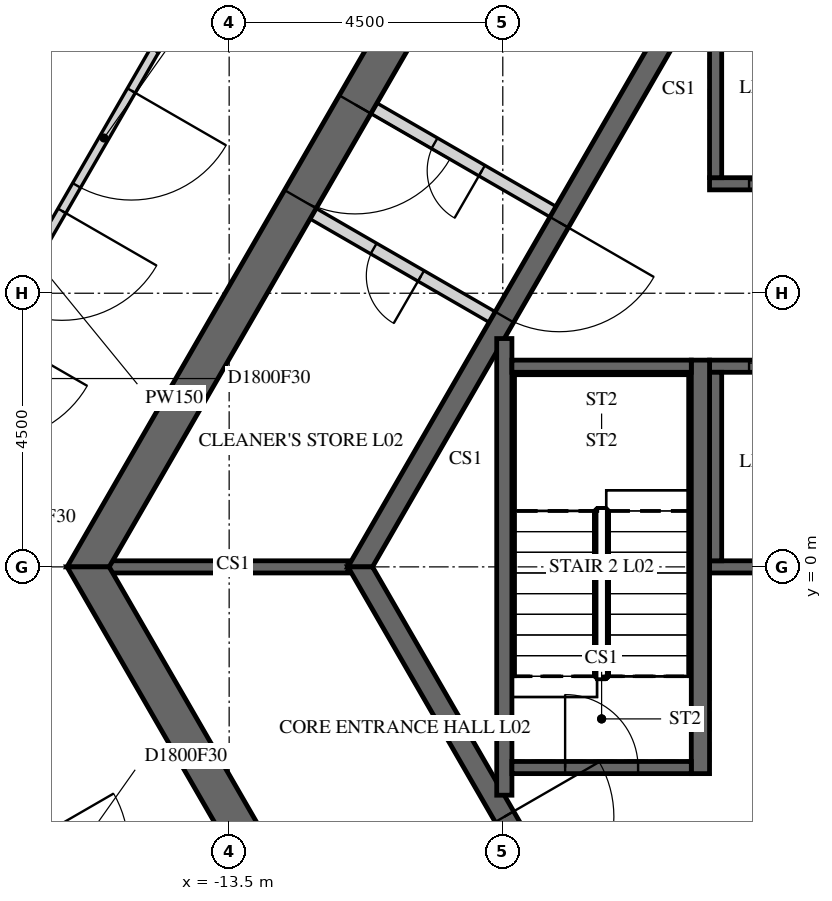
"""IFC4 building model, lengths in metres.
Left out: names, types, materials, properties, quantities, classifications, styles, units other than length and angle.
Written with IfcOpenShell. Run it as: python <this file> out.ifc"""

import sys

from ifc_helpers import new_model, si_unit, direction, frame, frame_2d, origin, place, context, subcontext, project, spatial, polyline, rectangle, outline, extrude, element, fill, save


model = new_model("IFC4")
c1 = context("Model", 3, precision=1e-05, world=origin(), true_north=direction((0.0, 1.0)))
c2 = subcontext(c1, "Body", "Model", "MODEL_VIEW")
j1 = project(units=[si_unit("LENGTHUNIT", "METRE"), si_unit("PLANEANGLEUNIT", "RADIAN")], contexts=[c1])
p1 = place(None, origin())
s1 = spatial("IfcSite", under=j1, at=p1, CompositionType="ELEMENT")
p2 = place(p1, origin())
s2 = spatial("IfcBuilding", under=s1, at=p2, CompositionType="ELEMENT")
p3 = place(p2, frame((0.0, 0.0, 15.0)))
s3 = spatial("IfcBuildingStorey", under=s2, at=p3, CompositionType="ELEMENT", Elevation=15.0)
p4 = place(p3, frame((-7.91, 13.7, -0.25), z_axis=(0.0, 0.0, 1.0), x_axis=(-0.499999880136, -0.866025472988, 0.0)))
e1 = element("IfcWall", 1, at=p4, inside=s3, PredefinedType="SHEAR", context=c2, shape_type="SweptSolid", body=[
    extrude(outline(polyline([(-0.173, -0.3), (15.993, -0.3), (15.646, 0.3), (0.173, 0.3), (-0.173, -0.3)])), origin(), (0.0, 0.0, 1.0), 5.5),
])
p5 = place(p4, frame((7.039, 0.0, 0.25)))
e2 = element("IfcOpeningElement", 2, at=p5, cuts=e1, PredefinedType="OPENING", context=c2, shape_type="SweptSolid", body=[
    extrude(rectangle(XDim=1.8, YDim=2.4, at=frame_2d((0.9, 1.2))), frame((0.0, 0.31, 0.0), z_axis=(0.0, -1.0, 0.0), x_axis=(1.0, 0.0, 0.0)), (0.0, 0.0, 1.0), 0.62),
])
p6 = place(p3, frame((-15.819, 0.0, -0.25), z_axis=(0.0, 0.0, 1.0), x_axis=(0.499999880136, -0.866025472988, 0.0)))
e3 = element("IfcWall", 3, at=p6, inside=s3, PredefinedType="SHEAR", context=c2, shape_type="SweptSolid", body=[
    extrude(outline(polyline([(-0.173, -0.3), (15.993, -0.3), (15.646, 0.3), (0.173, 0.3), (-0.173, -0.3)])), origin(), (0.0, 0.0, 1.0), 5.5),
])
p7 = place(p6, frame((6.981, 0.0, 0.25)))
e4 = element("IfcOpeningElement", 4, at=p7, cuts=e3, PredefinedType="OPENING", context=c2, shape_type="SweptSolid", body=[
    extrude(rectangle(XDim=1.8, YDim=2.4, at=frame_2d((0.9, 1.2))), frame((0.0, 0.31, 0.0), z_axis=(0.0, -1.0, 0.0), x_axis=(1.0, 0.0, 0.0)), (0.0, 0.0, 1.0), 0.62),
])
p8 = place(p3, frame((-5.673, 9.825, -0.25), z_axis=(0.0, 0.0, 1.0), x_axis=(-0.499995046907, -0.866028263435, 0.0)))
e5 = element("IfcWall", 5, at=p8, inside=s3, PredefinedType="SHEAR", context=c2, shape_type="SweptSolid", body=[
    extrude(outline(polyline([(-0.101, -0.175), (11.446, -0.175), (11.244, 0.175), (0.101, 0.175), (-0.101, -0.175)])), origin(), (0.0, 0.0, 1.0), 5.5),
])
p9 = place(p8, frame((4.801, 0.0, 0.25)))
e6 = element("IfcOpeningElement", 6, at=p9, cuts=e5, PredefinedType="OPENING", context=c2, shape_type="SweptSolid", body=[
    extrude(rectangle(XDim=1.8, YDim=2.4, at=frame_2d((0.9, 1.2))), frame((0.0, 0.185, 0.0), z_axis=(0.0, -1.0, 0.0), x_axis=(1.0, 0.0, 0.0)), (0.0, 0.0, 1.0), 0.37),
])
p10 = place(p3, frame((-11.345, 0.0, -0.25), z_axis=(0.0, 0.0, 1.0), x_axis=(0.499995046907, -0.866028263435, 0.0)))
e7 = element("IfcWall", 7, at=p10, inside=s3, PredefinedType="SHEAR", context=c2, shape_type="SweptSolid", body=[
    extrude(outline(polyline([(-0.101, -0.175), (11.446, -0.175), (11.244, 0.175), (0.101, 0.175), (-0.101, -0.175)])), origin(), (0.0, 0.0, 1.0), 5.5),
])
p11 = place(p10, frame((4.744, 0.0, 0.25)))
e8 = element("IfcOpeningElement", 8, at=p11, cuts=e7, PredefinedType="OPENING", context=c2, shape_type="SweptSolid", body=[
    extrude(rectangle(XDim=1.8, YDim=2.4, at=frame_2d((0.9, 1.2))), frame((0.0, 0.185, 0.0), z_axis=(0.0, -1.0, 0.0), x_axis=(1.0, 0.0, 0.0)), (0.0, 0.0, 1.0), 0.37),
])
p12 = place(p3, frame((-5.6, 6.3, -0.25), z_axis=(0.0, 0.0, 1.0), x_axis=(1.0, 0.0, 0.0)))
e9 = element("IfcWall", 9, at=p12, inside=s3, PredefinedType="SHEAR", context=c2, shape_type="SweptSolid", body=[
    extrude(rectangle(XDim=11.2, YDim=0.2, at=frame_2d((5.6, 0.0))), origin(), (0.0, 0.0, 1.0), 5.5),
])
p13 = place(p12, frame((0.65, 0.0, 0.25)))
e10 = element("IfcOpeningElement", 10, at=p13, cuts=e9, PredefinedType="OPENING", context=c2, shape_type="SweptSolid", body=[
    extrude(rectangle(XDim=1.1, YDim=2.1, at=frame_2d((0.55, 1.05))), frame((0.0, 0.11, 0.0), z_axis=(0.0, -1.0, 0.0), x_axis=(1.0, 0.0, 0.0)), (0.0, 0.0, 1.0), 0.22),
])
p14 = place(p12, frame((2.85, 0.0, 0.25)))
e11 = element("IfcOpeningElement", 11, at=p14, cuts=e9, PredefinedType="OPENING", context=c2, shape_type="SweptSolid", body=[
    extrude(rectangle(XDim=1.1, YDim=2.1, at=frame_2d((0.55, 1.05))), frame((0.0, 0.11, 0.0), z_axis=(0.0, -1.0, 0.0), x_axis=(1.0, 0.0, 0.0)), (0.0, 0.0, 1.0), 0.22),
])
p15 = place(p12, frame((5.05, 0.0, 0.25)))
e12 = element("IfcOpeningElement", 12, at=p15, cuts=e9, PredefinedType="OPENING", context=c2, shape_type="SweptSolid", body=[
    extrude(rectangle(XDim=1.1, YDim=2.1, at=frame_2d((0.55, 1.05))), frame((0.0, 0.11, 0.0), z_axis=(0.0, -1.0, 0.0), x_axis=(1.0, 0.0, 0.0)), (0.0, 0.0, 1.0), 0.22),
])
p16 = place(p12, frame((7.25, 0.0, 0.25)))
e13 = element("IfcOpeningElement", 13, at=p16, cuts=e9, PredefinedType="OPENING", context=c2, shape_type="SweptSolid", body=[
    extrude(rectangle(XDim=1.1, YDim=2.1, at=frame_2d((0.55, 1.05))), frame((0.0, 0.11, 0.0), z_axis=(0.0, -1.0, 0.0), x_axis=(1.0, 0.0, 0.0)), (0.0, 0.0, 1.0), 0.22),
])
p17 = place(p12, frame((9.45, 0.0, 0.25)))
e14 = element("IfcOpeningElement", 14, at=p17, cuts=e9, PredefinedType="OPENING", context=c2, shape_type="SweptSolid", body=[
    extrude(rectangle(XDim=1.1, YDim=2.1, at=frame_2d((0.55, 1.05))), frame((0.0, 0.11, 0.0), z_axis=(0.0, -1.0, 0.0), x_axis=(1.0, 0.0, 0.0)), (0.0, 0.0, 1.0), 0.22),
])
p18 = place(p3, frame((-5.5, 6.4, -0.25), z_axis=(0.0, 0.0, 1.0), x_axis=(0.0, 1.0, 0.0)))
e15 = element("IfcWall", 15, at=p18, inside=s3, PredefinedType="SHEAR", context=c2, shape_type="SweptSolid", body=[
    extrude(rectangle(XDim=2.9, YDim=0.2, at=frame_2d((1.45, 0.0))), origin(), (0.0, 0.0, 1.0), 5.5),
])
p19 = place(p3, frame((-5.6, 3.3, -0.25), z_axis=(0.0, 0.0, 1.0), x_axis=(1.0, 0.0, 0.0)))
e16 = element("IfcWall", 16, at=p19, inside=s3, PredefinedType="SHEAR", context=c2, shape_type="SweptSolid", body=[
    extrude(rectangle(XDim=11.2, YDim=0.2, at=frame_2d((5.6, 0.0))), origin(), (0.0, 0.0, 1.0), 5.5),
])
p20 = place(p19, frame((0.65, 0.0, 0.25)))
e17 = element("IfcOpeningElement", 17, at=p20, cuts=e16, PredefinedType="OPENING", context=c2, shape_type="SweptSolid", body=[
    extrude(rectangle(XDim=1.1, YDim=2.1, at=frame_2d((0.55, 1.05))), frame((0.0, 0.11, 0.0), z_axis=(0.0, -1.0, 0.0), x_axis=(1.0, 0.0, 0.0)), (0.0, 0.0, 1.0), 0.22),
])
p21 = place(p19, frame((2.85, 0.0, 0.25)))
e18 = element("IfcOpeningElement", 18, at=p21, cuts=e16, PredefinedType="OPENING", context=c2, shape_type="SweptSolid", body=[
    extrude(rectangle(XDim=1.1, YDim=2.1, at=frame_2d((0.55, 1.05))), frame((0.0, 0.11, 0.0), z_axis=(0.0, -1.0, 0.0), x_axis=(1.0, 0.0, 0.0)), (0.0, 0.0, 1.0), 0.22),
])
p22 = place(p19, frame((5.05, 0.0, 0.25)))
e19 = element("IfcOpeningElement", 19, at=p22, cuts=e16, PredefinedType="OPENING", context=c2, shape_type="SweptSolid", body=[
    extrude(rectangle(XDim=1.1, YDim=2.1, at=frame_2d((0.55, 1.05))), frame((0.0, 0.11, 0.0), z_axis=(0.0, -1.0, 0.0), x_axis=(1.0, 0.0, 0.0)), (0.0, 0.0, 1.0), 0.22),
])
p23 = place(p19, frame((7.25, 0.0, 0.25)))
e20 = element("IfcOpeningElement", 20, at=p23, cuts=e16, PredefinedType="OPENING", context=c2, shape_type="SweptSolid", body=[
    extrude(rectangle(XDim=1.1, YDim=2.1, at=frame_2d((0.55, 1.05))), frame((0.0, 0.11, 0.0), z_axis=(0.0, -1.0, 0.0), x_axis=(1.0, 0.0, 0.0)), (0.0, 0.0, 1.0), 0.22),
])
p24 = place(p19, frame((9.45, 0.0, 0.25)))
e21 = element("IfcOpeningElement", 21, at=p24, cuts=e16, PredefinedType="OPENING", context=c2, shape_type="SweptSolid", body=[
    extrude(rectangle(XDim=1.1, YDim=2.1, at=frame_2d((0.55, 1.05))), frame((0.0, 0.11, 0.0), z_axis=(0.0, -1.0, 0.0), x_axis=(1.0, 0.0, 0.0)), (0.0, 0.0, 1.0), 0.22),
])
p25 = place(p3, frame((-5.6, 0.0, -0.25), z_axis=(0.0, 0.0, 1.0), x_axis=(1.0, 0.0, 0.0)))
e22 = element("IfcWall", 22, at=p25, inside=s3, PredefinedType="SHEAR", context=c2, shape_type="SweptSolid", body=[
    extrude(rectangle(XDim=11.2, YDim=0.2, at=frame_2d((5.6, 0.0))), origin(), (0.0, 0.0, 1.0), 5.5),
])
p26 = place(p3, frame((-5.5, 0.1, -0.25), z_axis=(0.0, 0.0, 1.0), x_axis=(0.0, 1.0, 0.0)))
e23 = element("IfcWall", 23, at=p26, inside=s3, PredefinedType="SHEAR", context=c2, shape_type="SweptSolid", body=[
    extrude(rectangle(XDim=3.1, YDim=0.2, at=frame_2d((1.55, 0.0))), origin(), (0.0, 0.0, 1.0), 5.5),
])
p27 = place(p3, frame((-11.547, 0.0, -0.25), z_axis=(0.0, 0.0, 1.0), x_axis=(-1.0, 0.0, 0.0)))
e24 = element("IfcWall", 24, at=p27, inside=s3, PredefinedType="SHEAR", context=c2, shape_type="SweptSolid", body=[
    extrude(rectangle(XDim=3.926, YDim=0.2, at=frame_2d((1.963, 0.0))), origin(), (0.0, 0.0, 1.0), 5.5),
])
p28 = place(p3, frame((-9.175, 4.109, 0.0), z_axis=(0.0, 0.0, 1.0), x_axis=(-0.865989465428, 0.500062241894, 0.0)))
e25 = element("IfcWall", 25, at=p28, inside=s3, PredefinedType="PARTITIONING", context=c2, shape_type="SweptSolid", body=[
    extrude(rectangle(XDim=3.4, YDim=0.2, at=frame_2d((1.7, 0.0))), origin(), (0.0, 0.0, 1.0), 5.25),
])
p29 = place(p28, frame((1.351, 0.0, 0.0)))
e26 = element("IfcOpeningElement", 26, at=p29, cuts=e25, PredefinedType="OPENING", context=c2, shape_type="SweptSolid", body=[
    extrude(rectangle(XDim=0.9, YDim=2.1, at=frame_2d((0.45, 1.05))), frame((0.0, 0.11, 0.0), z_axis=(0.0, -1.0, 0.0), x_axis=(1.0, 0.0, 0.0)), (0.0, 0.0, 1.0), 0.22),
])
p30 = place(p3, frame((-8.175, 5.841, 0.0), z_axis=(0.0, 0.0, 1.0), x_axis=(-0.866020560687, 0.500008388397, 0.0)))
e27 = element("IfcWall", 27, at=p30, inside=s3, PredefinedType="PARTITIONING", context=c2, shape_type="SweptSolid", body=[
    extrude(rectangle(XDim=3.4, YDim=0.2, at=frame_2d((1.7, 0.0))), origin(), (0.0, 0.0, 1.0), 5.25),
])
p31 = place(p30, frame((1.35, 0.0, 0.0)))
e28 = element("IfcOpeningElement", 28, at=p31, cuts=e27, PredefinedType="OPENING", context=c2, shape_type="SweptSolid", body=[
    extrude(rectangle(XDim=0.9, YDim=2.1, at=frame_2d((0.45, 1.05))), frame((0.0, 0.11, 0.0), z_axis=(0.0, -1.0, 0.0), x_axis=(1.0, 0.0, 0.0)), (0.0, 0.0, 1.0), 0.22),
])
p32 = place(p3, frame((-5.75, -3.4, -0.25), z_axis=(0.0, 0.0, 1.0), x_axis=(0.0, 1.0, 0.0)))
e29 = element("IfcWall", 29, at=p32, inside=s3, PredefinedType="SHEAR", context=c2, shape_type="SweptSolid", body=[
    extrude(rectangle(XDim=6.8, YDim=0.3, at=frame_2d((3.4, 0.0))), origin(), (0.0, 0.0, 1.0), 5.5),
])
p33 = place(p3, frame((-8.975, -3.755, -0.25), z_axis=(0.0, 0.0, 1.0), x_axis=(0.0, 1.0, 0.0)))
e30 = element("IfcWall", 30, at=p33, inside=s3, PredefinedType="SHEAR", context=c2, shape_type="SweptSolid", body=[
    extrude(rectangle(XDim=7.51, YDim=0.25, at=frame_2d((3.755, 0.0))), origin(), (0.0, 0.0, 1.0), 5.5),
])
p34 = place(p3, frame((-8.85, 3.3, -0.25), z_axis=(0.0, 0.0, 1.0), x_axis=(1.0, 0.0, 0.0)))
e31 = element("IfcWall", 31, at=p34, inside=s3, PredefinedType="SHEAR", context=c2, shape_type="SweptSolid", body=[
    extrude(rectangle(XDim=2.95, YDim=0.2, at=frame_2d((1.475, 0.0))), origin(), (0.0, 0.0, 1.0), 5.5),
])
p35 = place(p3, frame((-8.85, -3.3, -0.25), z_axis=(0.0, 0.0, 1.0), x_axis=(1.0, 0.0, 0.0)))
e32 = element("IfcWall", 32, at=p35, inside=s3, PredefinedType="SHEAR", context=c2, shape_type="SweptSolid", body=[
    extrude(rectangle(XDim=2.95, YDim=0.2, at=frame_2d((1.475, 0.0))), origin(), (0.0, 0.0, 1.0), 5.5),
])
p36 = place(p35, frame((0.875, 0.0, 0.25)))
e33 = element("IfcOpeningElement", 33, at=p36, cuts=e32, PredefinedType="OPENING", context=c2, shape_type="SweptSolid", body=[
    extrude(rectangle(XDim=1.2, YDim=2.4, at=frame_2d((0.6, 1.2))), frame((0.0, 0.11, 0.0), z_axis=(0.0, -1.0, 0.0), x_axis=(1.0, 0.0, 0.0)), (0.0, 0.0, 1.0), 0.22),
])
p37 = place(p3, frame((-18.649, -1.7, 0.0), z_axis=(0.0, 0.0, 1.0), x_axis=(0.499985805234, -0.866033598981, 0.0)))
e34 = element("IfcWall", 34, at=p37, inside=s3, PredefinedType="PARTITIONING", context=c2, shape_type="SweptSolid", body=[
    extrude(rectangle(XDim=8.56, YDim=0.15, at=frame_2d((4.28, 0.0))), origin(), (0.0, 0.0, 1.0), 5.25),
])
p38 = place(p37, frame((0.836, 0.0, 0.0)))
e35 = element("IfcOpeningElement", 35, at=p38, cuts=e34, PredefinedType="OPENING", context=c2, shape_type="SweptSolid", body=[
    extrude(rectangle(XDim=1.8, YDim=2.1, at=frame_2d((0.9, 1.05))), frame((0.0, 0.085, 0.0), z_axis=(0.0, -1.0, 0.0), x_axis=(1.0, 0.0, 0.0)), (0.0, 0.0, 1.0), 0.17),
])
p39 = place(p37, frame((3.38, 0.0, 0.0)))
e36 = element("IfcOpeningElement", 36, at=p39, cuts=e34, PredefinedType="OPENING", context=c2, shape_type="SweptSolid", body=[
    extrude(rectangle(XDim=1.8, YDim=2.1, at=frame_2d((0.9, 1.05))), frame((0.0, 0.085, 0.0), z_axis=(0.0, -1.0, 0.0), x_axis=(1.0, 0.0, 0.0)), (0.0, 0.0, 1.0), 0.17),
])
p40 = place(p37, frame((5.924, 0.0, 0.0)))
e37 = element("IfcOpeningElement", 37, at=p40, cuts=e34, PredefinedType="OPENING", context=c2, shape_type="SweptSolid", body=[
    extrude(rectangle(XDim=1.8, YDim=2.1, at=frame_2d((0.9, 1.05))), frame((0.0, 0.085, 0.0), z_axis=(0.0, -1.0, 0.0), x_axis=(1.0, 0.0, 0.0)), (0.0, 0.0, 1.0), 0.17),
])
p41 = place(p3, frame((-14.723, 8.5, 0.0), z_axis=(0.0, 0.0, 1.0), x_axis=(-0.499993197506, -0.86602933117, 0.0)))
e38 = element("IfcWall", 38, at=p41, inside=s3, PredefinedType="PARTITIONING", context=c2, shape_type="SweptSolid", body=[
    extrude(rectangle(XDim=7.91, YDim=0.15, at=frame_2d((3.955, 0.0))), origin(), (0.0, 0.0, 1.0), 5.25),
])
p42 = place(p41, frame((0.771, 0.0, 0.0)))
e39 = element("IfcOpeningElement", 39, at=p42, cuts=e38, PredefinedType="OPENING", context=c2, shape_type="SweptSolid", body=[
    extrude(rectangle(XDim=1.8, YDim=2.1, at=frame_2d((0.9, 1.05))), frame((0.0, 0.085, 0.0), z_axis=(0.0, -1.0, 0.0), x_axis=(1.0, 0.0, 0.0)), (0.0, 0.0, 1.0), 0.17),
])
p43 = place(p41, frame((3.055, 0.0, 0.0)))
e40 = element("IfcOpeningElement", 40, at=p43, cuts=e38, PredefinedType="OPENING", context=c2, shape_type="SweptSolid", body=[
    extrude(rectangle(XDim=1.8, YDim=2.1, at=frame_2d((0.9, 1.05))), frame((0.0, 0.085, 0.0), z_axis=(0.0, -1.0, 0.0), x_axis=(1.0, 0.0, 0.0)), (0.0, 0.0, 1.0), 0.17),
])
p44 = place(p41, frame((5.339, 0.0, 0.0)))
e41 = element("IfcOpeningElement", 41, at=p44, cuts=e38, PredefinedType="OPENING", context=c2, shape_type="SweptSolid", body=[
    extrude(rectangle(XDim=1.8, YDim=2.1, at=frame_2d((0.9, 1.05))), frame((0.0, 0.085, 0.0), z_axis=(0.0, -1.0, 0.0), x_axis=(1.0, 0.0, 0.0)), (0.0, 0.0, 1.0), 0.17),
])
p45 = place(p5, origin())
e42 = element("IfcDoor", 42, at=p45, inside=s3, OperationType="DOUBLE_DOOR_SINGLE_SWING", PredefinedType="DOOR", context=c2, shape_type="SweptSolid", body=[
    extrude(rectangle(XDim=1.8, YDim=2.4, at=frame_2d((0.9, 1.2))), frame((0.0, 0.025, 0.0), z_axis=(0.0, -1.0, 0.0), x_axis=(1.0, 0.0, 0.0)), (0.0, 0.0, 1.0), 0.05),
])
fill(e2, e42)
p46 = place(p9, origin())
e43 = element("IfcDoor", 43, at=p46, inside=s3, OperationType="DOUBLE_DOOR_SINGLE_SWING", PredefinedType="DOOR", context=c2, shape_type="SweptSolid", body=[
    extrude(rectangle(XDim=1.8, YDim=2.4, at=frame_2d((0.9, 1.2))), frame((0.0, 0.025, 0.0), z_axis=(0.0, -1.0, 0.0), x_axis=(1.0, 0.0, 0.0)), (0.0, 0.0, 1.0), 0.05),
])
fill(e6, e43)
p47 = place(p11, origin())
e44 = element("IfcDoor", 44, at=p47, inside=s3, OperationType="DOUBLE_DOOR_SINGLE_SWING", PredefinedType="DOOR", context=c2, shape_type="SweptSolid", body=[
    extrude(rectangle(XDim=1.8, YDim=2.4, at=frame_2d((0.9, 1.2))), frame((0.0, 0.025, 0.0), z_axis=(0.0, -1.0, 0.0), x_axis=(1.0, 0.0, 0.0)), (0.0, 0.0, 1.0), 0.05),
])
fill(e8, e44)
p48 = place(p29, origin())
e45 = element("IfcDoor", 45, at=p48, inside=s3, OperationType="SINGLE_SWING_LEFT", PredefinedType="DOOR", context=c2, shape_type="SweptSolid", body=[
    extrude(rectangle(XDim=0.9, YDim=2.1, at=frame_2d((0.45, 1.05))), frame((0.0, 0.025, 0.0), z_axis=(0.0, -1.0, 0.0), x_axis=(1.0, 0.0, 0.0)), (0.0, 0.0, 1.0), 0.05),
])
fill(e26, e45)
p49 = place(p31, origin())
e46 = element("IfcDoor", 46, at=p49, inside=s3, OperationType="SINGLE_SWING_LEFT", PredefinedType="DOOR", context=c2, shape_type="SweptSolid", body=[
    extrude(rectangle(XDim=0.9, YDim=2.1, at=frame_2d((0.45, 1.05))), frame((0.0, 0.025, 0.0), z_axis=(0.0, -1.0, 0.0), x_axis=(1.0, 0.0, 0.0)), (0.0, 0.0, 1.0), 0.05),
])
fill(e28, e46)
p50 = place(p36, origin())
e47 = element("IfcDoor", 47, at=p50, inside=s3, OperationType="SINGLE_SWING_LEFT", PredefinedType="DOOR", context=c2, shape_type="SweptSolid", body=[
    extrude(rectangle(XDim=1.2, YDim=2.4, at=frame_2d((0.6, 1.2))), frame((0.0, 0.025, 0.0), z_axis=(0.0, -1.0, 0.0), x_axis=(1.0, 0.0, 0.0)), (0.0, 0.0, 1.0), 0.05),
])
fill(e33, e47)
p51 = place(p13, origin())
e48 = element("IfcDoor", 48, at=p51, inside=s3, OperationType="SLIDING_TO_LEFT", PredefinedType="DOOR", context=c2, shape_type="SweptSolid", body=[
    extrude(rectangle(XDim=1.1, YDim=2.1, at=frame_2d((0.55, 1.05))), frame((0.0, 0.025, 0.0), z_axis=(0.0, -1.0, 0.0), x_axis=(1.0, 0.0, 0.0)), (0.0, 0.0, 1.0), 0.05),
])
fill(e10, e48)
p52 = place(p20, origin())
e49 = element("IfcDoor", 49, at=p52, inside=s3, OperationType="SLIDING_TO_LEFT", PredefinedType="DOOR", context=c2, shape_type="SweptSolid", body=[
    extrude(rectangle(XDim=1.1, YDim=2.1, at=frame_2d((0.55, 1.05))), frame((0.0, 0.025, 0.0), z_axis=(0.0, -1.0, 0.0), x_axis=(1.0, 0.0, 0.0)), (0.0, 0.0, 1.0), 0.05),
])
fill(e17, e49)
p53 = place(p42, origin())
e50 = element("IfcDoor", 50, at=p53, inside=s3, OperationType="DOUBLE_DOOR_SINGLE_SWING", PredefinedType="DOOR", context=c2, shape_type="SweptSolid", body=[
    extrude(rectangle(XDim=1.8, YDim=2.1, at=frame_2d((0.9, 1.05))), frame((0.0, 0.025, 0.0), z_axis=(0.0, -1.0, 0.0), x_axis=(1.0, 0.0, 0.0)), (0.0, 0.0, 1.0), 0.05),
])
fill(e39, e50)
p54 = place(p43, origin())
e51 = element("IfcDoor", 51, at=p54, inside=s3, OperationType="DOUBLE_DOOR_SINGLE_SWING", PredefinedType="DOOR", context=c2, shape_type="SweptSolid", body=[
    extrude(rectangle(XDim=1.8, YDim=2.1, at=frame_2d((0.9, 1.05))), frame((0.0, 0.025, 0.0), z_axis=(0.0, -1.0, 0.0), x_axis=(1.0, 0.0, 0.0)), (0.0, 0.0, 1.0), 0.05),
])
fill(e40, e51)
save(model, sys.argv[1])
